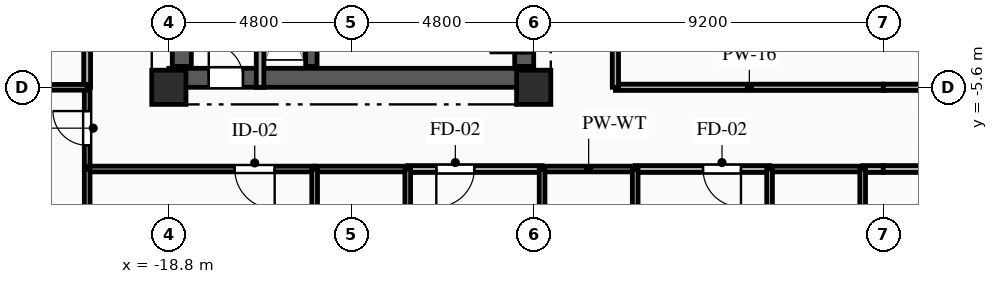
"""IFC4 building model, lengths in metres.
Left out: names, types, materials, properties, quantities, classifications, styles, units other than length and angle.
Written with IfcOpenShell. Run it as: python <this file> out.ifc"""

import sys

from ifc_helpers import new_model, si_unit, direction, frame, frame_2d, origin, origin_2d, place, context, subcontext, project, spatial, rectangle, extrude, element, fill, save


model = new_model("IFC4")
c1 = context("Model", 3, precision=1e-05, world=origin(), true_north=direction((0.0, 1.0)))
c2 = subcontext(c1, "Body", "Model", "MODEL_VIEW")
j1 = project(units=[si_unit("LENGTHUNIT", "METRE"), si_unit("PLANEANGLEUNIT", "RADIAN")], contexts=[c1])
p1 = place(None, origin())
s1 = spatial("IfcSite", under=j1, at=p1, CompositionType="ELEMENT")
p2 = place(p1, origin())
s2 = spatial("IfcBuilding", under=s1, at=p2, CompositionType="ELEMENT")
p3 = place(p2, frame((0.0, 0.0, 147.75)))
s3 = spatial("IfcBuildingStorey", under=s2, at=p3, CompositionType="ELEMENT", Elevation=147.75)
for number, where, z_axis, x_axis in (
    (1, (-18.8, -5.6, 0.0), (0.0, 0.0, 1.0), (1.0, 0.0, 0.0)),
    (2, (-9.2, -5.6, 0.0), (0.0, 0.0, 1.0), (1.0, 0.0, 0.0)),
):
    element("IfcColumn", number, at=place(p3, frame(where, z_axis=z_axis, x_axis=x_axis)), inside=s3, PredefinedType="COLUMN", context=c2, shape_type="SweptSolid", body=[
        extrude(rectangle(XDim=0.9, YDim=0.9, at=origin_2d()), origin(), (0.0, 0.0, 1.0), 3.35),
    ])
p4 = place(p3, frame((-18.8, -5.35, 0.0), z_axis=(0.0, 0.0, 1.0), x_axis=(1.0, 0.0, 0.0)))
e3 = element("IfcWall", 3, at=p4, inside=s3, PredefinedType="SHEAR", context=c2, shape_type="SweptSolid", body=[
    extrude(rectangle(XDim=9.6, YDim=0.5, at=frame_2d((4.8, 0.0))), origin(), (0.0, 0.0, 1.0), 3.04),
])
p5 = place(p4, frame((1.05, 0.0, 0.0)))
e4 = element("IfcOpeningElement", 4, at=p5, cuts=e3, PredefinedType="OPENING", context=c2, shape_type="SweptSolid", body=[
    extrude(rectangle(XDim=0.9, YDim=2.1, at=frame_2d((0.45, 1.05))), frame((0.0, 0.26, 0.0), z_axis=(0.0, -1.0, 0.0), x_axis=(1.0, 0.0, 0.0)), (0.0, 0.0, 1.0), 0.52),
])
p6 = place(p3, frame((-18.46, -5.05, 0.0), z_axis=(0.0, 0.0, 1.0), x_axis=(0.0, 1.0, 0.0)))
e5 = element("IfcWall", 5, at=p6, inside=s3, PredefinedType="SHEAR", context=c2, shape_type="SweptSolid", body=[
    extrude(rectangle(XDim=10.1, YDim=0.5, at=frame_2d((5.05, 0.0))), origin(), (0.0, 0.0, 1.0), 3.04),
])
p7 = place(p3, frame((-9.45, -5.05, 0.0), z_axis=(0.0, 0.0, 1.0), x_axis=(0.0, 1.0, 0.0)))
e6 = element("IfcWall", 6, at=p7, inside=s3, PredefinedType="SHEAR", context=c2, shape_type="SweptSolid", body=[
    extrude(rectangle(XDim=10.1, YDim=0.5, at=frame_2d((5.05, 0.0))), origin(), (0.0, 0.0, 1.0), 3.04),
])
p8 = place(p7, frame((7.175, 0.0, 0.0)))
e7 = element("IfcOpeningElement", 7, at=p8, cuts=e6, PredefinedType="OPENING", context=c2, shape_type="SweptSolid", body=[
    extrude(rectangle(XDim=0.9, YDim=2.1, at=frame_2d((0.45, 1.05))), frame((0.0, 0.26, 0.0), z_axis=(0.0, -1.0, 0.0), x_axis=(1.0, 0.0, 0.0)), (0.0, 0.0, 1.0), 0.52),
])
p9 = place(p7, frame((2.4, 0.0, 0.0)))
e8 = element("IfcOpeningElement", 8, at=p9, cuts=e6, PredefinedType="OPENING", context=c2, shape_type="SweptSolid", body=[
    extrude(rectangle(XDim=1.2, YDim=2.15, at=frame_2d((0.6, 1.075))), frame((0.0, 0.26, 0.0), z_axis=(0.0, -1.0, 0.0), x_axis=(1.0, 0.0, 0.0)), (0.0, 0.0, 1.0), 0.52),
])
p10 = place(p7, frame((0.35, 0.0, 0.0)))
e9 = element("IfcOpeningElement", 9, at=p10, cuts=e6, PredefinedType="OPENING", context=c2, shape_type="SweptSolid", body=[
    extrude(rectangle(XDim=0.9, YDim=2.1, at=frame_2d((0.45, 1.05))), frame((0.0, 0.26, 0.0), z_axis=(0.0, -1.0, 0.0), x_axis=(1.0, 0.0, 0.0)), (0.0, 0.0, 1.0), 0.52),
])
p11 = place(p7, frame((5.0, 0.0, 0.0)))
e10 = element("IfcOpeningElement", 10, at=p11, cuts=e6, PredefinedType="OPENING", context=c2, shape_type="SweptSolid", body=[
    extrude(rectangle(XDim=0.9, YDim=2.1, at=frame_2d((0.45, 1.05))), frame((0.0, 0.26, 0.0), z_axis=(0.0, -1.0, 0.0), x_axis=(1.0, 0.0, 0.0)), (0.0, 0.0, 1.0), 0.52),
])
p12 = place(p3, frame((-15.05, -5.05, 0.0), z_axis=(0.0, 0.0, 1.0), x_axis=(0.0, 1.0, 0.0)))
e11 = element("IfcWall", 11, at=p12, inside=s3, PredefinedType="SHEAR", context=c2, shape_type="SweptSolid", body=[
    extrude(rectangle(XDim=10.1, YDim=0.3, at=frame_2d((5.05, 0.0))), origin(), (0.0, 0.0, 1.0), 3.04),
])
p13 = place(p3, frame((-16.4, -5.6, 0.0), z_axis=(0.0, 0.0, 1.0), x_axis=(0.0, 1.0, 0.0)))
e12 = element("IfcWall", 12, at=p13, inside=s3, PredefinedType="PARTITIONING", context=c2, shape_type="SweptSolid", body=[
    extrude(rectangle(XDim=3.49, YDim=0.2, at=frame_2d((1.745, 0.0))), origin(), (0.0, 0.0, 1.0), 3.04),
])
p14 = place(p3, frame((-20.95, -7.75, 0.0), z_axis=(0.0, 0.0, 1.0), x_axis=(0.0, 1.0, 0.0)))
e13 = element("IfcWall", 13, at=p14, inside=s3, PredefinedType="PARTITIONING", context=c2, shape_type="SweptSolid", body=[
    extrude(rectangle(XDim=2.15, YDim=0.15, at=frame_2d((1.075, 0.0))), origin(), (0.0, 0.0, 1.0), 3.04),
])
p15 = place(p14, frame((0.625, 0.0, 0.0)))
e14 = element("IfcOpeningElement", 14, at=p15, cuts=e13, PredefinedType="OPENING", context=c2, shape_type="SweptSolid", body=[
    extrude(rectangle(XDim=0.9, YDim=2.1, at=frame_2d((0.45, 1.05))), frame((0.0, 0.085, 0.0), z_axis=(0.0, -1.0, 0.0), x_axis=(1.0, 0.0, 0.0)), (0.0, 0.0, 1.0), 0.17),
])
p16 = place(p3, frame((-14.964, -7.75, 0.0), z_axis=(0.0, 0.0, 1.0), x_axis=(-1.0, 0.0, 0.0)))
e15 = element("IfcWall", 15, at=p16, inside=s3, PredefinedType="PARTITIONING", context=c2, shape_type="SweptSolid", body=[
    extrude(rectangle(XDim=5.986, YDim=0.15, at=frame_2d((2.993, 0.0))), origin(), (0.0, 0.0, 1.0), 3.04),
])
p17 = place(p16, frame((1.052, 0.0, 0.0)))
e16 = element("IfcOpeningElement", 16, at=p17, cuts=e15, PredefinedType="OPENING", context=c2, shape_type="SweptSolid", body=[
    extrude(rectangle(XDim=1.05, YDim=2.15, at=frame_2d((0.525, 1.075))), frame((0.0, 0.085, 0.0), z_axis=(0.0, -1.0, 0.0), x_axis=(1.0, 0.0, 0.0)), (0.0, 0.0, 1.0), 0.17),
])
p18 = place(p3, frame((-8.979, -7.75, 0.0), z_axis=(0.0, 0.0, 1.0), x_axis=(-1.0, 0.0, 0.0)))
e17 = element("IfcWall", 17, at=p18, inside=s3, PredefinedType="PARTITIONING", context=c2, shape_type="SweptSolid", body=[
    extrude(rectangle(XDim=3.535, YDim=0.18, at=frame_2d((1.768, 0.0))), origin(), (0.0, 0.0, 1.0), 3.04),
])
p19 = place(p18, frame((1.783, 0.0, 0.0)))
e18 = element("IfcOpeningElement", 18, at=p19, cuts=e17, PredefinedType="OPENING", context=c2, shape_type="SweptSolid", body=[
    extrude(rectangle(XDim=1.0, YDim=2.15, at=frame_2d((0.5, 1.075))), frame((0.0, 0.1, 0.0), z_axis=(0.0, -1.0, 0.0), x_axis=(1.0, 0.0, 0.0)), (0.0, 0.0, 1.0), 0.2),
])
p20 = place(p3, frame((-12.514, -7.75, 0.0), z_axis=(0.0, 0.0, 1.0), x_axis=(-1.0, 0.0, 0.0)))
e19 = element("IfcWall", 19, at=p20, inside=s3, PredefinedType="PLUMBINGWALL", context=c2, shape_type="SweptSolid", body=[
    extrude(rectangle(XDim=2.45, YDim=0.15, at=frame_2d((1.225, 0.0))), origin(), (0.0, 0.0, 1.0), 3.04),
])
p21 = place(p3, frame((-2.993, -7.75, 0.0), z_axis=(0.0, 0.0, 1.0), x_axis=(-1.0, 0.0, 0.0)))
e20 = element("IfcWall", 20, at=p21, inside=s3, PredefinedType="PARTITIONING", context=c2, shape_type="SweptSolid", body=[
    extrude(rectangle(XDim=3.536, YDim=0.18, at=frame_2d((1.768, 0.0))), origin(), (0.0, 0.0, 1.0), 3.04),
])
p22 = place(p21, frame((0.752, 0.0, 0.0)))
e21 = element("IfcOpeningElement", 21, at=p22, cuts=e20, PredefinedType="OPENING", context=c2, shape_type="SweptSolid", body=[
    extrude(rectangle(XDim=1.0, YDim=2.15, at=frame_2d((0.5, 1.075))), frame((0.0, 0.1, 0.0), z_axis=(0.0, -1.0, 0.0), x_axis=(1.0, 0.0, 0.0)), (0.0, 0.0, 1.0), 0.2),
])
p23 = place(p3, frame((-6.529, -7.75, 0.0), z_axis=(0.0, 0.0, 1.0), x_axis=(-1.0, 0.0, 0.0)))
e22 = element("IfcWall", 22, at=p23, inside=s3, PredefinedType="PLUMBINGWALL", context=c2, shape_type="SweptSolid", body=[
    extrude(rectangle(XDim=2.45, YDim=0.15, at=frame_2d((1.225, 0.0))), origin(), (0.0, 0.0, 1.0), 3.04),
])
p24 = place(p3, frame((0.0, -7.75, 0.0), z_axis=(0.0, 0.0, 1.0), x_axis=(-1.0, 0.0, 0.0)))
e23 = element("IfcWall", 23, at=p24, inside=s3, PredefinedType="PARTITIONING", context=c2, shape_type="SweptSolid", body=[
    extrude(rectangle(XDim=0.543, YDim=0.18, at=frame_2d((0.271, 0.0))), origin(), (0.0, 0.0, 1.0), 3.04),
])
p25 = place(p3, frame((-0.543, -7.75, 0.0), z_axis=(0.0, 0.0, 1.0), x_axis=(-1.0, 0.0, 0.0)))
e24 = element("IfcWall", 24, at=p25, inside=s3, PredefinedType="PLUMBINGWALL", context=c2, shape_type="SweptSolid", body=[
    extrude(rectangle(XDim=2.45, YDim=0.15, at=frame_2d((1.225, 0.0))), origin(), (0.0, 0.0, 1.0), 3.04),
])
p26 = place(p3, frame((-7.05, -5.6, 0.0), z_axis=(0.0, 0.0, 1.0), x_axis=(1.0, 0.0, 0.0)))
e25 = element("IfcWall", 25, at=p26, inside=s3, PredefinedType="PARTITIONING", context=c2, shape_type="SweptSolid", body=[
    extrude(rectangle(XDim=7.05, YDim=0.165, at=frame_2d((3.525, 0.0))), origin(), (0.0, 0.0, 1.0), 2.525),
])
p27 = place(p3, frame((2.993, -7.75, 0.0), z_axis=(0.0, 0.0, 1.0), x_axis=(-1.0, 0.0, 0.0)))
e26 = element("IfcWall", 26, at=p27, inside=s3, PredefinedType="PARTITIONING", context=c2, shape_type="SweptSolid", body=[
    extrude(rectangle(XDim=2.993, YDim=0.18, at=frame_2d((1.497, 0.0))), origin(), (0.0, 0.0, 1.0), 3.04),
])
p28 = place(p27, frame((0.892, 0.0, 0.0)))
e27 = element("IfcOpeningElement", 27, at=p28, cuts=e26, PredefinedType="OPENING", context=c2, shape_type="SweptSolid", body=[
    extrude(rectangle(XDim=1.0, YDim=2.15, at=frame_2d((0.5, 1.075))), frame((0.0, 0.1, 0.0), z_axis=(0.0, -1.0, 0.0), x_axis=(1.0, 0.0, 0.0)), (0.0, 0.0, 1.0), 0.2),
])
p29 = place(p3, frame((0.0, -5.6, 0.0), z_axis=(0.0, 0.0, 1.0), x_axis=(1.0, 0.0, 0.0)))
e28 = element("IfcWall", 28, at=p29, inside=s3, PredefinedType="PARTITIONING", context=c2, shape_type="SweptSolid", body=[
    extrude(rectangle(XDim=7.05, YDim=0.165, at=frame_2d((3.525, 0.0))), origin(), (0.0, 0.0, 1.0), 2.525),
])
p30 = place(p3, frame((-20.95, -5.6, 0.0), z_axis=(0.0, 0.0, 1.0), x_axis=(0.0, 1.0, 0.0)))
e29 = element("IfcWall", 29, at=p30, inside=s3, PredefinedType="PARTITIONING", context=c2, shape_type="SweptSolid", body=[
    extrude(rectangle(XDim=14.1, YDim=0.18, at=frame_2d((7.05, 0.0))), origin(), (0.0, 0.0, 1.0), 3.04),
])
p31 = place(p30, frame((5.058, 0.0, 0.0)))
e30 = element("IfcOpeningElement", 30, at=p31, cuts=e29, PredefinedType="OPENING", context=c2, shape_type="SweptSolid", body=[
    extrude(rectangle(XDim=1.0, YDim=2.15, at=frame_2d((0.5, 1.075))), frame((0.0, 0.1, 0.0), z_axis=(0.0, -1.0, 0.0), x_axis=(1.0, 0.0, 0.0)), (0.0, 0.0, 1.0), 0.2),
])
p32 = place(p3, frame((-7.05, -2.95, 0.0), z_axis=(0.0, 0.0, 1.0), x_axis=(0.0, -1.0, 0.0)))
e31 = element("IfcWall", 31, at=p32, inside=s3, PredefinedType="PARTITIONING", context=c2, shape_type="SweptSolid", body=[
    extrude(rectangle(XDim=2.65, YDim=0.165, at=frame_2d((1.325, 0.0))), origin(), (0.0, 0.0, 1.0), 3.04),
])
p33 = place(p3, frame((-20.95, -5.6, 0.0), z_axis=(0.0, 0.0, 1.0), x_axis=(-1.0, 0.0, 0.0)))
e32 = element("IfcWall", 32, at=p33, inside=s3, PredefinedType="PARTITIONING", context=c2, shape_type="SweptSolid", body=[
    extrude(rectangle(XDim=2.65, YDim=0.15, at=frame_2d((1.325, 0.0))), origin(), (0.0, 0.0, 1.0), 3.04),
])
p34 = place(p33, frame((0.965, 0.0, 0.0)))
e33 = element("IfcOpeningElement", 33, at=p34, cuts=e32, PredefinedType="OPENING", context=c2, shape_type="SweptSolid", body=[
    extrude(rectangle(XDim=1.05, YDim=2.15, at=frame_2d((0.525, 1.075))), frame((0.0, 0.085, 0.0), z_axis=(0.0, -1.0, 0.0), x_axis=(1.0, 0.0, 0.0)), (0.0, 0.0, 1.0), 0.17),
])
p35 = place(p3, frame((-20.95, -7.75, 0.0), z_axis=(0.0, 0.0, 1.0), x_axis=(0.0, -1.0, 0.0)))
e34 = element("IfcWall", 34, at=p35, inside=s3, PredefinedType="PARTITIONING", context=c2, shape_type="SweptSolid", body=[
    extrude(rectangle(XDim=7.85, YDim=0.15, at=frame_2d((3.925, 0.0))), origin(), (0.0, 0.0, 1.0), 3.04),
])
for number, where, z_axis, x_axis in (
    (35, (-14.964, -7.75, 0.0), (0.0, 0.0, 1.0), (0.0, -1.0, 0.0)),
    (36, (-12.514, -9.9, 0.0), (0.0, 0.0, 1.0), (0.0, 1.0, 0.0)),
):
    element("IfcWall", number, at=place(p3, frame(where, z_axis=z_axis, x_axis=x_axis)), inside=s3, PredefinedType="PLUMBINGWALL", context=c2, shape_type="SweptSolid", body=[
        extrude(rectangle(XDim=2.15, YDim=0.15, at=frame_2d((1.075, 0.0))), origin(), (0.0, 0.0, 1.0), 3.04),
    ])
p36 = place(p3, frame((-8.979, -7.75, 0.0), z_axis=(0.0, 0.0, 1.0), x_axis=(0.0, -1.0, 0.0)))
e37 = element("IfcWall", 37, at=p36, inside=s3, PredefinedType="PLUMBINGWALL", context=c2, shape_type="SweptSolid", body=[
    extrude(rectangle(XDim=2.15, YDim=0.15, at=frame_2d((1.075, 0.0))), origin(), (0.0, 0.0, 1.0), 2.525),
])
for number, where, z_axis, x_axis in (
    (38, (-6.529, -9.9, 0.0), (0.0, 0.0, 1.0), (0.0, 1.0, 0.0)),
    (39, (-2.993, -7.75, 0.0), (0.0, 0.0, 1.0), (0.0, -1.0, 0.0)),
    (40, (-0.543, -9.9, 0.0), (0.0, 0.0, 1.0), (0.0, 1.0, 0.0)),
):
    element("IfcWall", number, at=place(p3, frame(where, z_axis=z_axis, x_axis=x_axis)), inside=s3, PredefinedType="PLUMBINGWALL", context=c2, shape_type="SweptSolid", body=[
        extrude(rectangle(XDim=2.15, YDim=0.15, at=frame_2d((1.075, 0.0))), origin(), (0.0, 0.0, 1.0), 3.04),
    ])
p37 = place(p5, origin())
e41 = element("IfcDoor", 41, at=p37, inside=s3, OperationType="SINGLE_SWING_LEFT", PredefinedType="DOOR", context=c2, shape_type="SweptSolid", body=[
    extrude(rectangle(XDim=0.9, YDim=2.1, at=frame_2d((0.45, 1.05))), frame((0.0, 0.025, 0.0), z_axis=(0.0, -1.0, 0.0), x_axis=(1.0, 0.0, 0.0)), (0.0, 0.0, 1.0), 0.05),
])
fill(e4, e41)
p38 = place(p10, origin())
e42 = element("IfcDoor", 42, at=p38, inside=s3, OperationType="SINGLE_SWING_LEFT", PredefinedType="DOOR", context=c2, shape_type="SweptSolid", body=[
    extrude(rectangle(XDim=0.9, YDim=2.1, at=frame_2d((0.45, 1.05))), frame((0.0, 0.025, 0.0), z_axis=(0.0, -1.0, 0.0), x_axis=(1.0, 0.0, 0.0)), (0.0, 0.0, 1.0), 0.05),
])
fill(e9, e42)
p39 = place(p15, origin())
e43 = element("IfcDoor", 43, at=p39, inside=s3, OperationType="SINGLE_SWING_RIGHT", PredefinedType="DOOR", context=c2, shape_type="SweptSolid", body=[
    extrude(rectangle(XDim=0.9, YDim=2.1, at=frame_2d((0.45, 1.05))), frame((0.0, 0.025, 0.0), z_axis=(0.0, -1.0, 0.0), x_axis=(1.0, 0.0, 0.0)), (0.0, 0.0, 1.0), 0.05),
])
fill(e14, e43)
p40 = place(p17, origin())
e44 = element("IfcDoor", 44, at=p40, inside=s3, OperationType="SINGLE_SWING_LEFT", PredefinedType="DOOR", context=c2, shape_type="SweptSolid", body=[
    extrude(rectangle(XDim=1.05, YDim=2.15, at=frame_2d((0.525, 1.075))), frame((0.0, 0.025, 0.0), z_axis=(0.0, -1.0, 0.0), x_axis=(1.0, 0.0, 0.0)), (0.0, 0.0, 1.0), 0.05),
])
fill(e16, e44)
p41 = place(p19, origin())
e45 = element("IfcDoor", 45, at=p41, inside=s3, OperationType="SINGLE_SWING_RIGHT", PredefinedType="DOOR", context=c2, shape_type="SweptSolid", body=[
    extrude(rectangle(XDim=1.0, YDim=2.15, at=frame_2d((0.5, 1.075))), frame((0.0, 0.025, 0.0), z_axis=(0.0, -1.0, 0.0), x_axis=(1.0, 0.0, 0.0)), (0.0, 0.0, 1.0), 0.05),
])
fill(e18, e45)
p42 = place(p22, origin())
e46 = element("IfcDoor", 46, at=p42, inside=s3, OperationType="SINGLE_SWING_LEFT", PredefinedType="DOOR", context=c2, shape_type="SweptSolid", body=[
    extrude(rectangle(XDim=1.0, YDim=2.15, at=frame_2d((0.5, 1.075))), frame((0.0, 0.025, 0.0), z_axis=(0.0, -1.0, 0.0), x_axis=(1.0, 0.0, 0.0)), (0.0, 0.0, 1.0), 0.05),
])
fill(e21, e46)
save(model, sys.argv[1])
